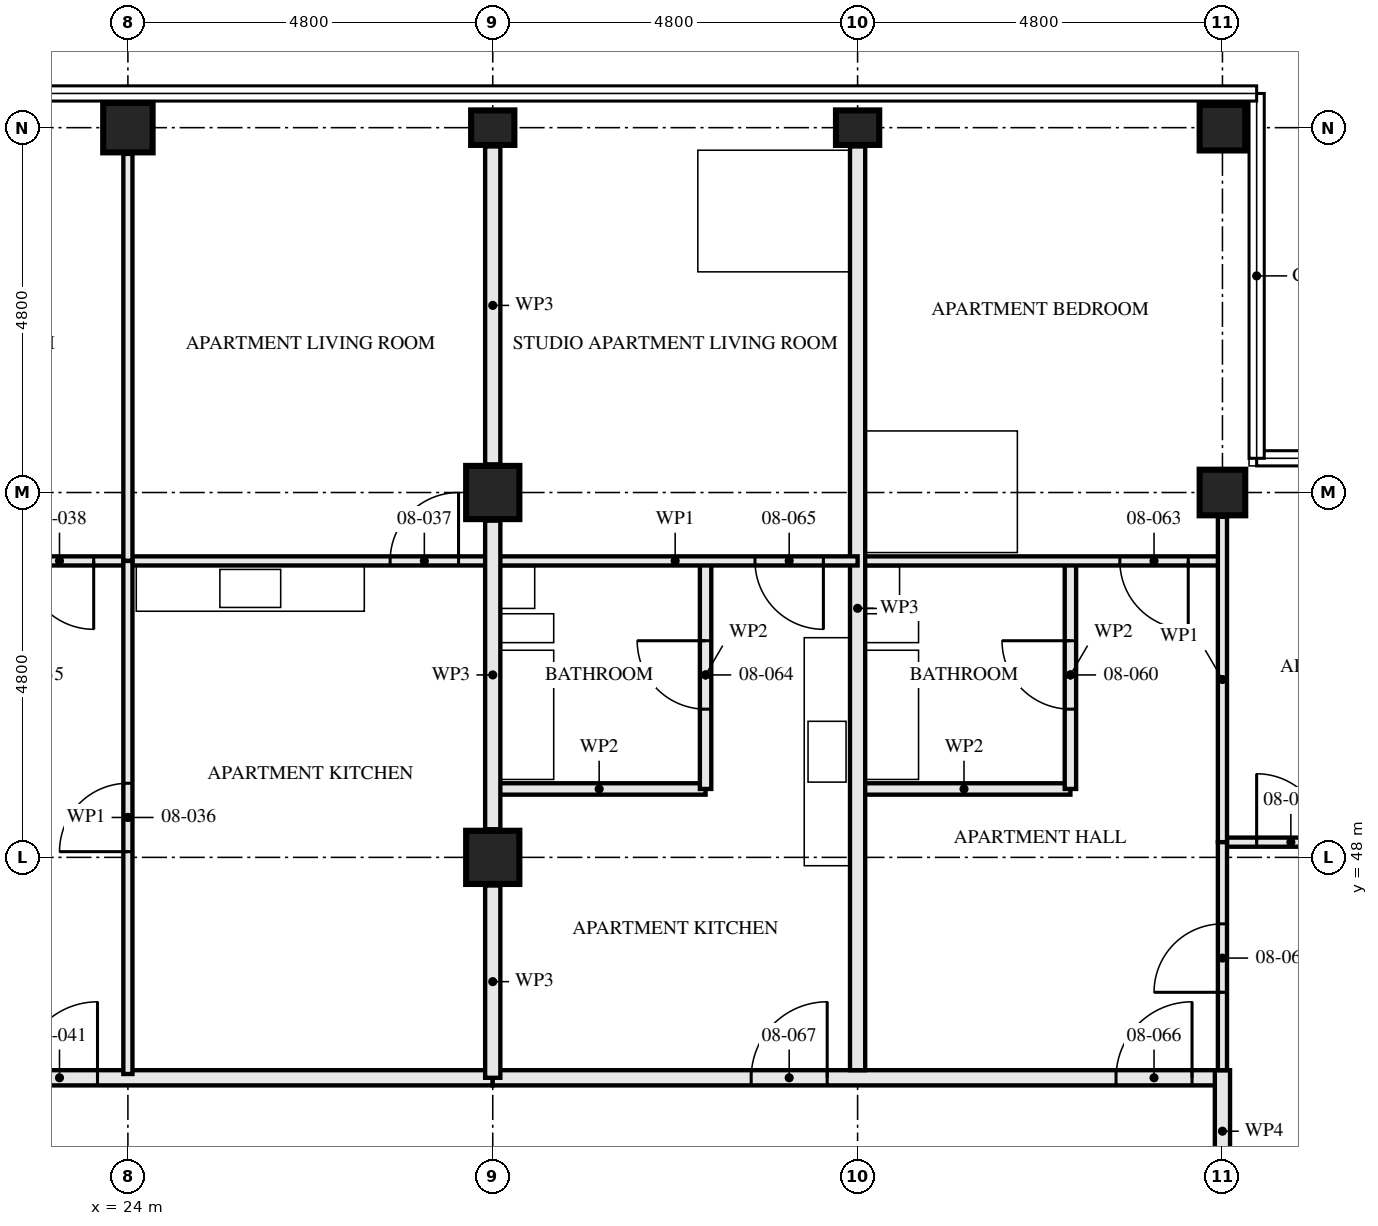
"""IFC4 building model, lengths in metres.
Left out: names, types, materials, properties, quantities, classifications, styles, units other than length and angle.
Written with IfcOpenShell. Run it as: python <this file> out.ifc"""

import sys

from ifc_helpers import new_model, si_unit, direction, frame, frame_2d, origin, origin_2d, place, context, subcontext, project, spatial, rectangle, hollow_rectangle, i_section, extrude, element, fill, save


model = new_model("IFC4")
c1 = context("Model", 3, precision=1e-05, world=origin(), true_north=direction((0.0, 1.0)))
c2 = subcontext(c1, "Body", "Model", "MODEL_VIEW")
j1 = project(units=[si_unit("LENGTHUNIT", "METRE"), si_unit("PLANEANGLEUNIT", "RADIAN")], contexts=[c1])
p1 = place(None, origin())
s1 = spatial("IfcSite", under=j1, at=p1, CompositionType="ELEMENT")
p2 = place(p1, origin())
s2 = spatial("IfcBuilding", under=s1, at=p2, CompositionType="ELEMENT")
p3 = place(p2, frame((0.0, 0.0, 34.0)))
s3 = spatial("IfcBuildingStorey", under=s2, at=p3, CompositionType="ELEMENT", Elevation=34.0)
p4 = place(p3, frame((24.0, 57.6, 0.0), z_axis=(0.0, 0.0, 1.0), x_axis=(0.0, 1.0, 0.0)))
e1 = element("IfcColumn", 1, at=p4, inside=s3, PredefinedType="COLUMN", context=c2, shape_type="SweptSolid", body=[
    extrude(hollow_rectangle(XDim=0.65, YDim=0.65, WallThickness=0.08, at=origin_2d()), origin(), (0.0, 0.0, 1.0), 3.5),
])
for number, where, z_axis, x_axis in (
    (2, (28.8, 48.0, 0.0), (0.0, 0.0, 1.0), (1.0, 0.0, 0.0)),
    (3, (28.8, 52.8, 0.0), (0.0, 0.0, 1.0), (1.0, 0.0, 0.0)),
):
    element("IfcColumn", number, at=place(p3, frame(where, z_axis=z_axis, x_axis=x_axis)), inside=s3, PredefinedType="COLUMN", context=c2, shape_type="SweptSolid", body=[
        extrude(hollow_rectangle(XDim=0.7, YDim=0.7, WallThickness=0.06, at=origin_2d()), origin(), (0.0, 0.0, 1.0), 3.5),
    ])
for number, where, z_axis, x_axis in (
    (4, (28.8, 57.6, 0.0), (0.0, 0.0, 1.0), (0.0, 1.0, 0.0)),
    (5, (33.6, 57.6, 0.0), (0.0, 0.0, 1.0), (0.0, 1.0, 0.0)),
):
    element("IfcColumn", number, at=place(p3, frame(where, z_axis=z_axis, x_axis=x_axis)), inside=s3, PredefinedType="COLUMN", context=c2, shape_type="SweptSolid", body=[
        extrude(i_section(OverallWidth=0.454, OverallDepth=0.569, WebThickness=0.078, FlangeThickness=0.125, FilletRadius=0.015, at=origin_2d()), origin(), (0.0, 0.0, 1.0), 3.5),
    ])
for number, where, z_axis, x_axis in (
    (6, (38.4, 52.8, 0.0), (0.0, 0.0, 1.0), (0.0, 1.0, 0.0)),
    (7, (38.4, 57.6, 0.0), (0.0, 0.0, 1.0), (0.0, 1.0, 0.0)),
):
    element("IfcColumn", number, at=place(p3, frame(where, z_axis=z_axis, x_axis=x_axis)), inside=s3, PredefinedType="COLUMN", context=c2, shape_type="SweptSolid", body=[
        extrude(hollow_rectangle(XDim=0.6, YDim=0.6, WallThickness=0.05, at=origin_2d()), origin(), (0.0, 0.0, 1.0), 3.5),
    ])
p5 = place(p3, frame((24.0, 51.9, 0.0), z_axis=(0.0, 0.0, 1.0), x_axis=(0.0, -1.0, 0.0)))
e8 = element("IfcWall", 8, at=p5, inside=s3, PredefinedType="PARTITIONING", context=c2, shape_type="SweptSolid", body=[
    extrude(rectangle(XDim=6.75, YDim=0.12, at=frame_2d((3.375, 0.0))), origin(), (0.0, 0.0, 1.0), 2.55),
])
p6 = place(p5, frame((2.925, 0.0, 0.0)))
e9 = element("IfcOpeningElement", 9, at=p6, cuts=e8, PredefinedType="OPENING", context=c2, shape_type="SweptSolid", body=[
    extrude(rectangle(XDim=0.9, YDim=2.1, at=frame_2d((0.45, 1.05))), frame((0.0, 0.071, 0.0), z_axis=(0.0, -1.0, 0.0), x_axis=(1.0, 0.0, 0.0)), (0.0, 0.0, 1.0), 0.141),
])
p7 = place(p3, frame((28.8, 51.9, 0.0), z_axis=(0.0, 0.0, 1.0), x_axis=(-1.0, 0.0, 0.0)))
e10 = element("IfcWall", 10, at=p7, inside=s3, PredefinedType="PARTITIONING", context=c2, shape_type="SweptSolid", body=[
    extrude(rectangle(XDim=4.8, YDim=0.12, at=frame_2d((2.4, 0.0))), origin(), (0.0, 0.0, 1.0), 3.33),
])
p8 = place(p7, frame((0.45, 0.0, 0.0)))
e11 = element("IfcOpeningElement", 11, at=p8, cuts=e10, PredefinedType="OPENING", context=c2, shape_type="SweptSolid", body=[
    extrude(rectangle(XDim=0.9, YDim=2.1, at=frame_2d((0.45, 1.05))), frame((0.0, 0.071, 0.0), z_axis=(0.0, -1.0, 0.0), x_axis=(1.0, 0.0, 0.0)), (0.0, 0.0, 1.0), 0.141),
])
p9 = place(p3, frame((24.0, 51.9, 0.0), z_axis=(0.0, 0.0, 1.0), x_axis=(-1.0, 0.0, 0.0)))
e12 = element("IfcWall", 12, at=p9, inside=s3, PredefinedType="PARTITIONING", context=c2, shape_type="SweptSolid", body=[
    extrude(rectangle(XDim=4.8, YDim=0.12, at=frame_2d((2.4, 0.0))), origin(), (0.0, 0.0, 1.0), 3.33),
])
p10 = place(p9, frame((0.45, 0.0, 0.0)))
e13 = element("IfcOpeningElement", 13, at=p10, cuts=e12, PredefinedType="OPENING", context=c2, shape_type="SweptSolid", body=[
    extrude(rectangle(XDim=0.9, YDim=2.1, at=frame_2d((0.45, 1.05))), frame((0.0, 0.071, 0.0), z_axis=(0.0, -1.0, 0.0), x_axis=(1.0, 0.0, 0.0)), (0.0, 0.0, 1.0), 0.141),
])
p11 = place(p3, frame((24.0, 57.255, 0.0), z_axis=(0.0, 0.0, 1.0), x_axis=(0.0, -1.0, 0.0)))
e14 = element("IfcWall", 14, at=p11, inside=s3, PredefinedType="PARTITIONING", context=c2, shape_type="SweptSolid", body=[
    extrude(rectangle(XDim=5.355, YDim=0.12, at=frame_2d((2.677, 0.0))), origin(), (0.0, 0.0, 1.0), 2.55),
])
p12 = place(p3, frame((28.8, 45.1, 0.0), z_axis=(0.0, 0.0, 1.0), x_axis=(-1.0, 0.0, 0.0)))
e15 = element("IfcWall", 15, at=p12, inside=s3, PredefinedType="PARTITIONING", context=c2, shape_type="SweptSolid", body=[
    extrude(rectangle(XDim=14.4, YDim=0.2, at=frame_2d((7.2, 0.0))), origin(), (0.0, 0.0, 1.0), 3.33),
])
p13 = place(p12, frame((5.2, 0.0, 0.0)))
e16 = element("IfcOpeningElement", 16, at=p13, cuts=e15, PredefinedType="OPENING", context=c2, shape_type="SweptSolid", body=[
    extrude(rectangle(XDim=1.0, YDim=2.1, at=frame_2d((0.5, 1.05))), frame((0.0, 0.111, 0.0), z_axis=(0.0, -1.0, 0.0), x_axis=(1.0, 0.0, 0.0)), (0.0, 0.0, 1.0), 0.221),
])
p14 = place(p12, frame((10.0, 0.0, 0.0)))
e17 = element("IfcOpeningElement", 17, at=p14, cuts=e15, PredefinedType="OPENING", context=c2, shape_type="SweptSolid", body=[
    extrude(rectangle(XDim=1.0, YDim=2.1, at=frame_2d((0.5, 1.05))), frame((0.0, 0.111, 0.0), z_axis=(0.0, -1.0, 0.0), x_axis=(1.0, 0.0, 0.0)), (0.0, 0.0, 1.0), 0.221),
])
p15 = place(p3, frame((36.4, 51.9, 0.0), z_axis=(0.0, 0.0, 1.0), x_axis=(0.0, -1.0, 0.0)))
e18 = element("IfcWall", 18, at=p15, inside=s3, PredefinedType="PARTITIONING", context=c2, shape_type="SweptSolid", body=[
    extrude(rectangle(XDim=3.0, YDim=0.15, at=frame_2d((1.5, 0.0))), origin(), (0.0, 0.0, 1.0), 3.33),
])
p16 = place(p15, frame((1.05, 0.0, 0.0)))
e19 = element("IfcOpeningElement", 19, at=p16, cuts=e18, PredefinedType="OPENING", context=c2, shape_type="SweptSolid", body=[
    extrude(rectangle(XDim=0.9, YDim=2.1, at=frame_2d((0.45, 1.05))), frame((0.0, 0.085, 0.0), z_axis=(0.0, -1.0, 0.0), x_axis=(1.0, 0.0, 0.0)), (0.0, 0.0, 1.0), 0.171),
])
p17 = place(p3, frame((36.4, 48.9, 0.0), z_axis=(0.0, 0.0, 1.0), x_axis=(-1.0, 0.0, 0.0)))
e20 = element("IfcWall", 20, at=p17, inside=s3, PredefinedType="PARTITIONING", context=c2, shape_type="SweptSolid", body=[
    extrude(rectangle(XDim=2.8, YDim=0.15, at=frame_2d((1.4, 0.0))), origin(), (0.0, 0.0, 1.0), 3.33),
])
p18 = place(p3, frame((38.4, 48.2, 0.0), z_axis=(0.0, 0.0, 1.0), x_axis=(0.0, -1.0, 0.0)))
e21 = element("IfcWall", 21, at=p18, inside=s3, PredefinedType="PARTITIONING", context=c2, shape_type="SweptSolid", body=[
    extrude(rectangle(XDim=3.0, YDim=0.12, at=frame_2d((1.5, 0.0))), origin(), (0.0, 0.0, 1.0), 2.55),
])
p19 = place(p18, frame((1.075, 0.0, 0.0)))
e22 = element("IfcOpeningElement", 22, at=p19, cuts=e21, PredefinedType="OPENING", context=c2, shape_type="SweptSolid", body=[
    extrude(rectangle(XDim=0.9, YDim=2.1, at=frame_2d((0.45, 1.05))), frame((0.0, 0.071, 0.0), z_axis=(0.0, -1.0, 0.0), x_axis=(1.0, 0.0, 0.0)), (0.0, 0.0, 1.0), 0.141),
])
p20 = place(p3, frame((42.953, 48.2, 0.0), z_axis=(0.0, 0.0, 1.0), x_axis=(-1.0, 0.0, 0.0)))
e23 = element("IfcWall", 23, at=p20, inside=s3, PredefinedType="PARTITIONING", context=c2, shape_type="SweptSolid", body=[
    extrude(rectangle(XDim=4.553, YDim=0.12, at=frame_2d((2.276, 0.0))), origin(), (0.0, 0.0, 1.0), 3.33),
])
p21 = place(p20, frame((3.203, 0.0, 0.0)))
e24 = element("IfcOpeningElement", 24, at=p21, cuts=e23, PredefinedType="OPENING", context=c2, shape_type="SweptSolid", body=[
    extrude(rectangle(XDim=0.9, YDim=2.1, at=frame_2d((0.45, 1.05))), frame((0.0, 0.071, 0.0), z_axis=(0.0, -1.0, 0.0), x_axis=(1.0, 0.0, 0.0)), (0.0, 0.0, 1.0), 0.141),
])
p22 = place(p3, frame((38.4, 51.9, 0.0), z_axis=(0.0, 0.0, 1.0), x_axis=(-1.0, 0.0, 0.0)))
e25 = element("IfcWall", 25, at=p22, inside=s3, PredefinedType="PARTITIONING", context=c2, shape_type="SweptSolid", body=[
    extrude(rectangle(XDim=4.8, YDim=0.12, at=frame_2d((2.4, 0.0))), origin(), (0.0, 0.0, 1.0), 3.33),
])
p23 = place(p22, frame((0.45, 0.0, 0.0)))
e26 = element("IfcOpeningElement", 26, at=p23, cuts=e25, PredefinedType="OPENING", context=c2, shape_type="SweptSolid", body=[
    extrude(rectangle(XDim=0.9, YDim=2.1, at=frame_2d((0.45, 1.05))), frame((0.0, 0.071, 0.0), z_axis=(0.0, -1.0, 0.0), x_axis=(1.0, 0.0, 0.0)), (0.0, 0.0, 1.0), 0.141),
])
p24 = place(p3, frame((38.4, 52.48, 0.0), z_axis=(0.0, 0.0, 1.0), x_axis=(0.0, -1.0, 0.0)))
e27 = element("IfcWall", 27, at=p24, inside=s3, PredefinedType="PARTITIONING", context=c2, shape_type="SweptSolid", body=[
    extrude(rectangle(XDim=4.28, YDim=0.12, at=frame_2d((2.14, 0.0))), origin(), (0.0, 0.0, 1.0), 3.33),
])
p25 = place(p3, frame((33.6, 57.353, 0.0), z_axis=(0.0, 0.0, 1.0), x_axis=(0.0, -1.0, 0.0)))
e28 = element("IfcWall", 28, at=p25, inside=s3, PredefinedType="PARTITIONING", context=c2, shape_type="SweptSolid", body=[
    extrude(rectangle(XDim=12.153, YDim=0.2, at=frame_2d((6.077, 0.0))), origin(), (0.0, 0.0, 1.0), 2.55),
])
p26 = place(p3, frame((31.6, 51.9, 0.0), z_axis=(0.0, 0.0, 1.0), x_axis=(0.0, -1.0, 0.0)))
e29 = element("IfcWall", 29, at=p26, inside=s3, PredefinedType="PARTITIONING", context=c2, shape_type="SweptSolid", body=[
    extrude(rectangle(XDim=3.0, YDim=0.15, at=frame_2d((1.5, 0.0))), origin(), (0.0, 0.0, 1.0), 3.33),
])
p27 = place(p26, frame((1.05, 0.0, 0.0)))
e30 = element("IfcOpeningElement", 30, at=p27, cuts=e29, PredefinedType="OPENING", context=c2, shape_type="SweptSolid", body=[
    extrude(rectangle(XDim=0.9, YDim=2.1, at=frame_2d((0.45, 1.05))), frame((0.0, 0.085, 0.0), z_axis=(0.0, -1.0, 0.0), x_axis=(1.0, 0.0, 0.0)), (0.0, 0.0, 1.0), 0.171),
])
p28 = place(p3, frame((31.6, 48.9, 0.0), z_axis=(0.0, 0.0, 1.0), x_axis=(-1.0, 0.0, 0.0)))
e31 = element("IfcWall", 31, at=p28, inside=s3, PredefinedType="PARTITIONING", context=c2, shape_type="SweptSolid", body=[
    extrude(rectangle(XDim=2.8, YDim=0.15, at=frame_2d((1.4, 0.0))), origin(), (0.0, 0.0, 1.0), 3.33),
])
p29 = place(p3, frame((33.6, 51.9, 0.0), z_axis=(0.0, 0.0, 1.0), x_axis=(-1.0, 0.0, 0.0)))
e32 = element("IfcWall", 32, at=p29, inside=s3, PredefinedType="PARTITIONING", context=c2, shape_type="SweptSolid", body=[
    extrude(rectangle(XDim=4.8, YDim=0.12, at=frame_2d((2.4, 0.0))), origin(), (0.0, 0.0, 1.0), 3.33),
])
p30 = place(p29, frame((0.45, 0.0, 0.0)))
e33 = element("IfcOpeningElement", 33, at=p30, cuts=e32, PredefinedType="OPENING", context=c2, shape_type="SweptSolid", body=[
    extrude(rectangle(XDim=0.9, YDim=2.1, at=frame_2d((0.45, 1.05))), frame((0.0, 0.071, 0.0), z_axis=(0.0, -1.0, 0.0), x_axis=(1.0, 0.0, 0.0)), (0.0, 0.0, 1.0), 0.141),
])
p31 = place(p3, frame((38.4, 45.1, 0.0), z_axis=(0.0, 0.0, 1.0), x_axis=(-1.0, 0.0, 0.0)))
e34 = element("IfcWall", 34, at=p31, inside=s3, PredefinedType="PARTITIONING", context=c2, shape_type="SweptSolid", body=[
    extrude(rectangle(XDim=9.6, YDim=0.2, at=frame_2d((4.8, 0.0))), origin(), (0.0, 0.0, 1.0), 3.33),
])
p32 = place(p31, frame((0.4, 0.0, 0.0)))
e35 = element("IfcOpeningElement", 35, at=p32, cuts=e34, PredefinedType="OPENING", context=c2, shape_type="SweptSolid", body=[
    extrude(rectangle(XDim=1.0, YDim=2.1, at=frame_2d((0.5, 1.05))), frame((0.0, 0.111, 0.0), z_axis=(0.0, -1.0, 0.0), x_axis=(1.0, 0.0, 0.0)), (0.0, 0.0, 1.0), 0.221),
])
p33 = place(p31, frame((5.2, 0.0, 0.0)))
e36 = element("IfcOpeningElement", 36, at=p33, cuts=e34, PredefinedType="OPENING", context=c2, shape_type="SweptSolid", body=[
    extrude(rectangle(XDim=1.0, YDim=2.1, at=frame_2d((0.5, 1.05))), frame((0.0, 0.111, 0.0), z_axis=(0.0, -1.0, 0.0), x_axis=(1.0, 0.0, 0.0)), (0.0, 0.0, 1.0), 0.221),
])
p34 = place(p3, frame((38.4, 45.2, 0.0), z_axis=(0.0, 0.0, 1.0), x_axis=(0.0, -1.0, 0.0)))
e37 = element("IfcWall", 37, at=p34, inside=s3, PredefinedType="PARTITIONING", context=c2, shape_type="SweptSolid", body=[
    extrude(rectangle(XDim=1.605, YDim=0.2, at=frame_2d((0.802, 0.0))), origin(), (0.0, 0.0, 1.0), 3.33),
])
p35 = place(p3, frame((28.8, 45.1, 0.0), z_axis=(0.0, 0.0, 1.0), x_axis=(0.0, 1.0, 0.0)))
e38 = element("IfcWall", 38, at=p35, inside=s3, PredefinedType="PARTITIONING", context=c2, shape_type="SweptSolid", body=[
    extrude(rectangle(XDim=2.53, YDim=0.2, at=frame_2d((1.265, 0.0))), origin(), (0.0, 0.0, 1.0), 2.32),
])
p36 = place(p3, frame((28.8, 48.37, 0.0), z_axis=(0.0, 0.0, 1.0), x_axis=(0.0, 1.0, 0.0)))
e39 = element("IfcWall", 39, at=p36, inside=s3, PredefinedType="PARTITIONING", context=c2, shape_type="SweptSolid", body=[
    extrude(rectangle(XDim=4.06, YDim=0.2, at=frame_2d((2.03, 0.0))), origin(), (0.0, 0.0, 1.0), 2.32),
])
p37 = place(p3, frame((28.8, 53.17, 0.0), z_axis=(0.0, 0.0, 1.0), x_axis=(0.0, 1.0, 0.0)))
e40 = element("IfcWall", 40, at=p37, inside=s3, PredefinedType="PARTITIONING", context=c2, shape_type="SweptSolid", body=[
    extrude(rectangle(XDim=4.183, YDim=0.2, at=frame_2d((2.092, 0.0))), origin(), (0.0, 0.0, 1.0), 2.32),
])
p38 = place(p6, frame((0.9, 0.0, 0.0), z_axis=(0.0, 0.0, 1.0), x_axis=(-1.0, 0.0, 0.0)))
e41 = element("IfcDoor", 41, at=p38, inside=s3, OperationType="SINGLE_SWING_RIGHT", PredefinedType="DOOR", context=c2, shape_type="SweptSolid", body=[
    extrude(rectangle(XDim=0.9, YDim=2.1, at=frame_2d((0.45, 1.05))), frame((0.0, 0.022, 0.0), z_axis=(0.0, -1.0, 0.0), x_axis=(1.0, 0.0, 0.0)), (0.0, 0.0, 1.0), 0.044),
])
fill(e9, e41)
p39 = place(p8, frame((0.9, 0.0, 0.0), z_axis=(0.0, 0.0, 1.0), x_axis=(-1.0, 0.0, 0.0)))
e42 = element("IfcDoor", 42, at=p39, inside=s3, OperationType="SINGLE_SWING_LEFT", PredefinedType="DOOR", context=c2, shape_type="SweptSolid", body=[
    extrude(rectangle(XDim=0.9, YDim=2.1, at=frame_2d((0.45, 1.05))), frame((0.0, 0.022, 0.0), z_axis=(0.0, -1.0, 0.0), x_axis=(1.0, 0.0, 0.0)), (0.0, 0.0, 1.0), 0.044),
])
fill(e11, e42)
p40 = place(p10, origin())
e43 = element("IfcDoor", 43, at=p40, inside=s3, OperationType="SINGLE_SWING_RIGHT", PredefinedType="DOOR", context=c2, shape_type="SweptSolid", body=[
    extrude(rectangle(XDim=0.9, YDim=2.1, at=frame_2d((0.45, 1.05))), frame((0.0, 0.022, 0.0), z_axis=(0.0, -1.0, 0.0), x_axis=(1.0, 0.0, 0.0)), (0.0, 0.0, 1.0), 0.044),
])
fill(e13, e43)
p41 = place(p13, frame((1.0, 0.0, 0.0), z_axis=(0.0, 0.0, 1.0), x_axis=(-1.0, 0.0, 0.0)))
e44 = element("IfcDoor", 44, at=p41, inside=s3, OperationType="SINGLE_SWING_LEFT", PredefinedType="DOOR", context=c2, shape_type="SweptSolid", body=[
    extrude(rectangle(XDim=1.0, YDim=2.1, at=frame_2d((0.5, 1.05))), frame((0.0, 0.027, 0.0), z_axis=(0.0, -1.0, 0.0), x_axis=(1.0, 0.0, 0.0)), (0.0, 0.0, 1.0), 0.054),
])
fill(e16, e44)
p42 = place(p16, frame((0.9, 0.0, 0.0), z_axis=(0.0, 0.0, 1.0), x_axis=(-1.0, 0.0, 0.0)))
e45 = element("IfcDoor", 45, at=p42, inside=s3, OperationType="SINGLE_SWING_LEFT", PredefinedType="DOOR", context=c2, shape_type="SweptSolid", body=[
    extrude(rectangle(XDim=0.9, YDim=2.1, at=frame_2d((0.45, 1.05))), frame((0.0, 0.022, 0.0), z_axis=(0.0, -1.0, 0.0), x_axis=(1.0, 0.0, 0.0)), (0.0, 0.0, 1.0), 0.044),
])
fill(e19, e45)
p43 = place(p19, frame((0.9, 0.0, 0.0), z_axis=(0.0, 0.0, 1.0), x_axis=(-1.0, 0.0, 0.0)))
e46 = element("IfcDoor", 46, at=p43, inside=s3, OperationType="SINGLE_SWING_RIGHT", PredefinedType="DOOR", context=c2, shape_type="SweptSolid", body=[
    extrude(rectangle(XDim=0.9, YDim=2.1, at=frame_2d((0.45, 1.05))), frame((0.0, 0.022, 0.0), z_axis=(0.0, -1.0, 0.0), x_axis=(1.0, 0.0, 0.0)), (0.0, 0.0, 1.0), 0.044),
])
fill(e22, e46)
p44 = place(p21, frame((0.9, 0.0, 0.0), z_axis=(0.0, 0.0, 1.0), x_axis=(-1.0, 0.0, 0.0)))
e47 = element("IfcDoor", 47, at=p44, inside=s3, OperationType="SINGLE_SWING_RIGHT", PredefinedType="DOOR", context=c2, shape_type="SweptSolid", body=[
    extrude(rectangle(XDim=0.9, YDim=2.1, at=frame_2d((0.45, 1.05))), frame((0.0, 0.022, 0.0), z_axis=(0.0, -1.0, 0.0), x_axis=(1.0, 0.0, 0.0)), (0.0, 0.0, 1.0), 0.044),
])
fill(e24, e47)
p45 = place(p23, origin())
e48 = element("IfcDoor", 48, at=p45, inside=s3, OperationType="SINGLE_SWING_RIGHT", PredefinedType="DOOR", context=c2, shape_type="SweptSolid", body=[
    extrude(rectangle(XDim=0.9, YDim=2.1, at=frame_2d((0.45, 1.05))), frame((0.0, 0.022, 0.0), z_axis=(0.0, -1.0, 0.0), x_axis=(1.0, 0.0, 0.0)), (0.0, 0.0, 1.0), 0.044),
])
fill(e26, e48)
p46 = place(p27, frame((0.9, 0.0, 0.0), z_axis=(0.0, 0.0, 1.0), x_axis=(-1.0, 0.0, 0.0)))
e49 = element("IfcDoor", 49, at=p46, inside=s3, OperationType="SINGLE_SWING_LEFT", PredefinedType="DOOR", context=c2, shape_type="SweptSolid", body=[
    extrude(rectangle(XDim=0.9, YDim=2.1, at=frame_2d((0.45, 1.05))), frame((0.0, 0.022, 0.0), z_axis=(0.0, -1.0, 0.0), x_axis=(1.0, 0.0, 0.0)), (0.0, 0.0, 1.0), 0.044),
])
fill(e30, e49)
p47 = place(p30, origin())
e50 = element("IfcDoor", 50, at=p47, inside=s3, OperationType="SINGLE_SWING_RIGHT", PredefinedType="DOOR", context=c2, shape_type="SweptSolid", body=[
    extrude(rectangle(XDim=0.9, YDim=2.1, at=frame_2d((0.45, 1.05))), frame((0.0, 0.022, 0.0), z_axis=(0.0, -1.0, 0.0), x_axis=(1.0, 0.0, 0.0)), (0.0, 0.0, 1.0), 0.044),
])
fill(e33, e50)
p48 = place(p32, frame((1.0, 0.0, 0.0), z_axis=(0.0, 0.0, 1.0), x_axis=(-1.0, 0.0, 0.0)))
e51 = element("IfcDoor", 51, at=p48, inside=s3, OperationType="SINGLE_SWING_LEFT", PredefinedType="DOOR", context=c2, shape_type="SweptSolid", body=[
    extrude(rectangle(XDim=1.0, YDim=2.1, at=frame_2d((0.5, 1.05))), frame((0.0, 0.027, 0.0), z_axis=(0.0, -1.0, 0.0), x_axis=(1.0, 0.0, 0.0)), (0.0, 0.0, 1.0), 0.054),
])
fill(e35, e51)
p49 = place(p33, frame((1.0, 0.0, 0.0), z_axis=(0.0, 0.0, 1.0), x_axis=(-1.0, 0.0, 0.0)))
e52 = element("IfcDoor", 52, at=p49, inside=s3, OperationType="SINGLE_SWING_LEFT", PredefinedType="DOOR", context=c2, shape_type="SweptSolid", body=[
    extrude(rectangle(XDim=1.0, YDim=2.1, at=frame_2d((0.5, 1.05))), frame((0.0, 0.027, 0.0), z_axis=(0.0, -1.0, 0.0), x_axis=(1.0, 0.0, 0.0)), (0.0, 0.0, 1.0), 0.054),
])
fill(e36, e52)
save(model, sys.argv[1])
